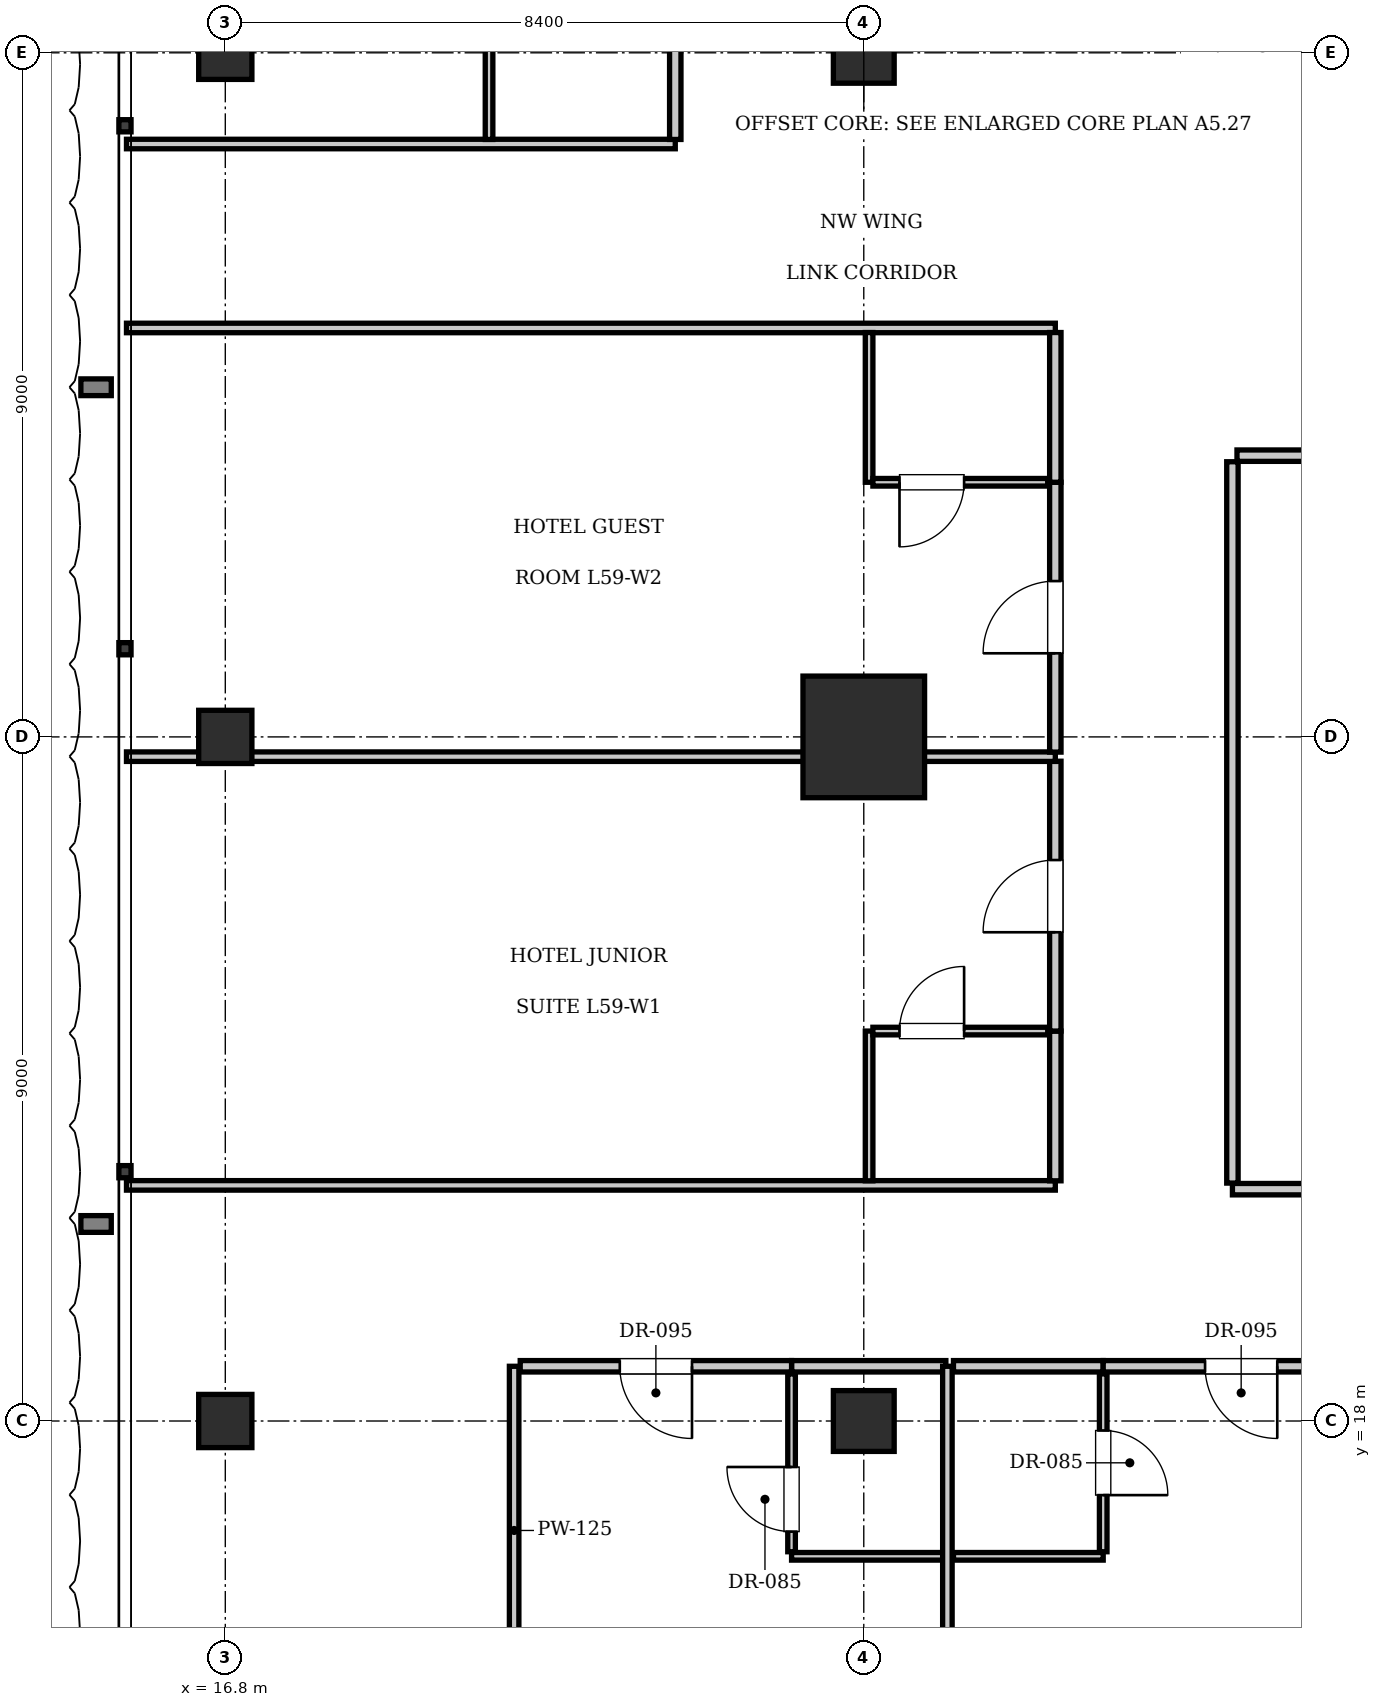
"""IFC4 building model, lengths in metres.
Left out: names, types, materials, properties, quantities, classifications, styles, units other than length and angle.
Written with IfcOpenShell. Run it as: python <this file> out.ifc"""

import sys

from ifc_helpers import new_model, si_unit, direction, frame, frame_2d, origin, origin_2d, place, context, subcontext, project, spatial, rectangle, extrude, element, fill, save


model = new_model("IFC4")
c1 = context("Model", 3, precision=1e-05, world=origin(), true_north=direction((0.0, 1.0)))
c2 = subcontext(c1, "Body", "Model", "MODEL_VIEW")
j1 = project(units=[si_unit("LENGTHUNIT", "METRE"), si_unit("PLANEANGLEUNIT", "RADIAN")], contexts=[c1])
p1 = place(None, origin())
s1 = spatial("IfcSite", under=j1, at=p1, CompositionType="ELEMENT")
p2 = place(p1, origin())
s2 = spatial("IfcBuilding", under=s1, at=p2, CompositionType="ELEMENT")
p3 = place(p2, frame((0.0, 0.0, 243.25)))
s3 = spatial("IfcBuildingStorey", under=s2, at=p3, CompositionType="ELEMENT", Elevation=243.25)
p4 = place(p3, frame((25.2, 27.0, 0.0), z_axis=(0.0, 0.0, 1.0), x_axis=(1.0, 0.0, 0.0)))
e1 = element("IfcColumn", 1, at=p4, inside=s3, PredefinedType="COLUMN", context=c2, shape_type="SweptSolid", body=[
    extrude(rectangle(XDim=1.6, YDim=1.6, at=origin_2d()), origin(), (0.0, 0.0, 1.0), 3.85),
])
for number, where, z_axis, x_axis in (
    (2, (25.2, 36.0, 0.0), (0.0, 0.0, 1.0), (1.0, 0.0, 0.0)),
    (3, (25.2, 18.0, 0.0), (0.0, 0.0, 1.0), (1.0, 0.0, 0.0)),
):
    element("IfcColumn", number, at=place(p3, frame(where, z_axis=z_axis, x_axis=x_axis)), inside=s3, PredefinedType="COLUMN", context=c2, shape_type="SweptSolid", body=[
        extrude(rectangle(XDim=0.8, YDim=0.8, at=origin_2d()), origin(), (0.0, 0.0, 1.0), 3.85),
    ])
for number, where, z_axis, x_axis in (
    (4, (16.8, 18.0, 0.0), (0.0, 0.0, 1.0), (1.0, 0.0, 0.0)),
    (5, (16.8, 27.0, 0.0), (0.0, 0.0, 1.0), (1.0, 0.0, 0.0)),
    (6, (16.8, 36.0, 0.0), (0.0, 0.0, 1.0), (1.0, 0.0, 0.0)),
):
    element("IfcColumn", number, at=place(p3, frame(where, z_axis=z_axis, x_axis=x_axis)), inside=s3, PredefinedType="COLUMN", context=c2, shape_type="SweptSolid", body=[
        extrude(rectangle(XDim=0.7, YDim=0.7, at=origin_2d()), origin(), (0.0, 0.0, 1.0), 3.85),
    ])
p5 = place(p3, frame((30.05, 21.05, 0.0), z_axis=(0.0, 0.0, 1.0), x_axis=(1.0, 0.0, 0.0)))
e7 = element("IfcWall", 7, at=p5, inside=s3, PredefinedType="PARTITIONING", context=c2, shape_type="SweptSolid", body=[
    extrude(rectangle(XDim=15.55, YDim=0.15, at=frame_2d((7.775, 0.0))), origin(), (0.0, 0.0, 1.0), 3.61),
])
p6 = place(p3, frame((30.05, 21.13, 0.0), z_axis=(0.0, 0.0, 1.0), x_axis=(0.0, 1.0, 0.0)))
e8 = element("IfcWall", 8, at=p6, inside=s3, PredefinedType="PARTITIONING", context=c2, shape_type="SweptSolid", body=[
    extrude(rectangle(XDim=9.49, YDim=0.15, at=frame_2d((4.745, 0.0))), origin(), (0.0, 0.0, 1.0), 3.61),
])
p7 = place(p3, frame((30.11, 30.7, 0.0), z_axis=(0.0, 0.0, 1.0), x_axis=(1.0, 0.0, 0.0)))
e9 = element("IfcWall", 9, at=p7, inside=s3, PredefinedType="PARTITIONING", context=c2, shape_type="SweptSolid", body=[
    extrude(rectangle(XDim=5.663, YDim=0.15, at=frame_2d((2.832, 0.0))), origin(), (0.0, 0.0, 1.0), 3.61),
])
p8 = place(p7, frame((2.382, 0.0, 0.0)))
e10 = element("IfcOpeningElement", 10, at=p8, cuts=e9, PredefinedType="OPENING", context=c2, shape_type="SweptSolid", body=[
    extrude(rectangle(XDim=0.9, YDim=2.1, at=frame_2d((0.45, 1.05))), frame((0.0, 0.085, 0.0), z_axis=(0.0, -1.0, 0.0), x_axis=(1.0, 0.0, 0.0)), (0.0, 0.0, 1.0), 0.17),
])
p9 = place(p3, frame((20.6, 14.4, 0.0), z_axis=(0.0, 0.0, 1.0), x_axis=(0.0, 1.0, 0.0)))
e11 = element("IfcWall", 11, at=p9, inside=s3, PredefinedType="PARTITIONING", context=c2, shape_type="SweptSolid", body=[
    extrude(rectangle(XDim=4.32, YDim=0.125, at=frame_2d((2.16, 0.0))), origin(), (0.0, 0.0, 1.0), 3.61),
])
p10 = place(p3, frame((24.25, 18.72, 0.0), z_axis=(0.0, 0.0, 1.0), x_axis=(1.0, 0.0, 0.0)))
e12 = element("IfcWall", 12, at=p10, inside=s3, PredefinedType="PARTITIONING", context=c2, shape_type="SweptSolid", body=[
    extrude(rectangle(XDim=2.03, YDim=0.15, at=frame_2d((1.015, 0.0))), origin(), (0.0, 0.0, 1.0), 3.61),
])
p11 = place(p3, frame((24.25, 16.22, 0.0), z_axis=(0.0, 0.0, 1.0), x_axis=(1.0, 0.0, 0.0)))
e13 = element("IfcWall", 13, at=p11, inside=s3, PredefinedType="PARTITIONING", context=c2, shape_type="SweptSolid", body=[
    extrude(rectangle(XDim=2.01, YDim=0.1, at=frame_2d((1.005, 0.0))), origin(), (0.0, 0.0, 1.0), 3.61),
])
p12 = place(p3, frame((24.25, 16.28, 0.0), z_axis=(0.0, 0.0, 1.0), x_axis=(0.0, 1.0, 0.0)))
e14 = element("IfcWall", 14, at=p12, inside=s3, PredefinedType="PARTITIONING", context=c2, shape_type="SweptSolid", body=[
    extrude(rectangle(XDim=2.34, YDim=0.1, at=frame_2d((1.17, 0.0))), origin(), (0.0, 0.0, 1.0), 3.61),
])
p13 = place(p12, frame((0.265, 0.0, 0.0)))
e15 = element("IfcOpeningElement", 15, at=p13, cuts=e14, PredefinedType="OPENING", context=c2, shape_type="SweptSolid", body=[
    extrude(rectangle(XDim=0.85, YDim=2.1, at=frame_2d((0.425, 1.05))), frame((0.0, 0.06, 0.0), z_axis=(0.0, -1.0, 0.0), x_axis=(1.0, 0.0, 0.0)), (0.0, 0.0, 1.0), 0.12),
])
p14 = place(p3, frame((20.68, 18.72, 0.0), z_axis=(0.0, 0.0, 1.0), x_axis=(1.0, 0.0, 0.0)))
e16 = element("IfcWall", 16, at=p14, inside=s3, PredefinedType="PARTITIONING", context=c2, shape_type="SweptSolid", body=[
    extrude(rectangle(XDim=3.57, YDim=0.15, at=frame_2d((1.785, 0.0))), origin(), (0.0, 0.0, 1.0), 3.61),
])
p15 = place(p14, frame((1.31, 0.0, 0.0)))
e17 = element("IfcOpeningElement", 17, at=p15, cuts=e16, PredefinedType="OPENING", context=c2, shape_type="SweptSolid", body=[
    extrude(rectangle(XDim=0.95, YDim=2.15, at=frame_2d((0.475, 1.075))), frame((0.0, 0.085, 0.0), z_axis=(0.0, -1.0, 0.0), x_axis=(1.0, 0.0, 0.0)), (0.0, 0.0, 1.0), 0.17),
])
p16 = place(p3, frame((26.3, 9.3, 0.0), z_axis=(0.0, 0.0, 1.0), x_axis=(0.0, 1.0, 0.0)))
e18 = element("IfcWall", 18, at=p16, inside=s3, PredefinedType="PARTITIONING", context=c2, shape_type="SweptSolid", body=[
    extrude(rectangle(XDim=9.42, YDim=0.125, at=frame_2d((4.71, 0.0))), origin(), (0.0, 0.0, 1.0), 3.61),
])
p17 = place(p3, frame((26.38, 18.72, 0.0), z_axis=(0.0, 0.0, 1.0), x_axis=(1.0, 0.0, 0.0)))
e19 = element("IfcWall", 19, at=p17, inside=s3, PredefinedType="PARTITIONING", context=c2, shape_type="SweptSolid", body=[
    extrude(rectangle(XDim=1.97, YDim=0.15, at=frame_2d((0.985, 0.0))), origin(), (0.0, 0.0, 1.0), 3.61),
])
p18 = place(p3, frame((26.38, 16.22, 0.0), z_axis=(0.0, 0.0, 1.0), x_axis=(1.0, 0.0, 0.0)))
e20 = element("IfcWall", 20, at=p18, inside=s3, PredefinedType="PARTITIONING", context=c2, shape_type="SweptSolid", body=[
    extrude(rectangle(XDim=1.97, YDim=0.1, at=frame_2d((0.985, 0.0))), origin(), (0.0, 0.0, 1.0), 3.61),
])
p19 = place(p3, frame((28.35, 16.28, 0.0), z_axis=(0.0, 0.0, 1.0), x_axis=(0.0, 1.0, 0.0)))
e21 = element("IfcWall", 21, at=p19, inside=s3, PredefinedType="PARTITIONING", context=c2, shape_type="SweptSolid", body=[
    extrude(rectangle(XDim=2.34, YDim=0.1, at=frame_2d((1.17, 0.0))), origin(), (0.0, 0.0, 1.0), 3.61),
])
p20 = place(p19, frame((0.745, 0.0, 0.0)))
e22 = element("IfcOpeningElement", 22, at=p20, cuts=e21, PredefinedType="OPENING", context=c2, shape_type="SweptSolid", body=[
    extrude(rectangle(XDim=0.85, YDim=2.1, at=frame_2d((0.425, 1.05))), frame((0.0, 0.06, 0.0), z_axis=(0.0, -1.0, 0.0), x_axis=(1.0, 0.0, 0.0)), (0.0, 0.0, 1.0), 0.12),
])
p21 = place(p3, frame((28.35, 18.72, 0.0), z_axis=(0.0, 0.0, 1.0), x_axis=(1.0, 0.0, 0.0)))
e23 = element("IfcWall", 23, at=p21, inside=s3, PredefinedType="PARTITIONING", context=c2, shape_type="SweptSolid", body=[
    extrude(rectangle(XDim=3.63, YDim=0.15, at=frame_2d((1.815, 0.0))), origin(), (0.0, 0.0, 1.0), 3.61),
])
p22 = place(p21, frame((1.34, 0.0, 0.0)))
e24 = element("IfcOpeningElement", 24, at=p22, cuts=e23, PredefinedType="OPENING", context=c2, shape_type="SweptSolid", body=[
    extrude(rectangle(XDim=0.95, YDim=2.15, at=frame_2d((0.475, 1.075))), frame((0.0, 0.085, 0.0), z_axis=(0.0, -1.0, 0.0), x_axis=(1.0, 0.0, 0.0)), (0.0, 0.0, 1.0), 0.17),
])
for number, where, z_axis, x_axis in (
    (25, (15.5, 21.1, 0.0), (0.0, 0.0, 1.0), (1.0, 0.0, 0.0)),
    (26, (15.5, 32.38, 0.0), (0.0, 0.0, 1.0), (1.0, 0.0, 0.0)),
):
    element("IfcWall", number, at=place(p3, frame(where, z_axis=z_axis, x_axis=x_axis)), inside=s3, PredefinedType="PARTITIONING", context=c2, shape_type="SweptSolid", body=[
        extrude(rectangle(XDim=12.22, YDim=0.125, at=frame_2d((6.11, 0.0))), origin(), (0.0, 0.0, 1.0), 3.61),
    ])
p23 = place(p3, frame((27.72, 21.16, 0.0), z_axis=(0.0, 0.0, 1.0), x_axis=(0.0, 1.0, 0.0)))
e27 = element("IfcWall", 27, at=p23, inside=s3, PredefinedType="PARTITIONING", context=c2, shape_type="SweptSolid", body=[
    extrude(rectangle(XDim=1.97, YDim=0.15, at=frame_2d((0.985, 0.0))), origin(), (0.0, 0.0, 1.0), 3.61),
])
p24 = place(p3, frame((27.72, 23.13, 0.0), z_axis=(0.0, 0.0, 1.0), x_axis=(0.0, 1.0, 0.0)))
e28 = element("IfcWall", 28, at=p24, inside=s3, PredefinedType="PARTITIONING", context=c2, shape_type="SweptSolid", body=[
    extrude(rectangle(XDim=3.55, YDim=0.15, at=frame_2d((1.775, 0.0))), origin(), (0.0, 0.0, 1.0), 3.61),
])
p25 = place(p24, frame((1.3, 0.0, 0.0)))
e29 = element("IfcOpeningElement", 29, at=p25, cuts=e28, PredefinedType="OPENING", context=c2, shape_type="SweptSolid", body=[
    extrude(rectangle(XDim=0.95, YDim=2.15, at=frame_2d((0.475, 1.075))), frame((0.0, 0.085, 0.0), z_axis=(0.0, -1.0, 0.0), x_axis=(1.0, 0.0, 0.0)), (0.0, 0.0, 1.0), 0.17),
])
p26 = place(p3, frame((25.27, 21.16, 0.0), z_axis=(0.0, 0.0, 1.0), x_axis=(0.0, 1.0, 0.0)))
e30 = element("IfcWall", 30, at=p26, inside=s3, PredefinedType="PARTITIONING", context=c2, shape_type="SweptSolid", body=[
    extrude(rectangle(XDim=1.97, YDim=0.1, at=frame_2d((0.985, 0.0))), origin(), (0.0, 0.0, 1.0), 3.077),
])
p27 = place(p3, frame((25.32, 23.13, 0.0), z_axis=(0.0, 0.0, 1.0), x_axis=(1.0, 0.0, 0.0)))
e31 = element("IfcWall", 31, at=p27, inside=s3, PredefinedType="PARTITIONING", context=c2, shape_type="SweptSolid", body=[
    extrude(rectangle(XDim=2.3, YDim=0.1, at=frame_2d((1.15, 0.0))), origin(), (0.0, 0.0, 1.0), 3.61),
])
p28 = place(p27, frame((0.35, 0.0, 0.0)))
e32 = element("IfcOpeningElement", 32, at=p28, cuts=e31, PredefinedType="OPENING", context=c2, shape_type="SweptSolid", body=[
    extrude(rectangle(XDim=0.85, YDim=2.1, at=frame_2d((0.425, 1.05))), frame((0.0, 0.06, 0.0), z_axis=(0.0, -1.0, 0.0), x_axis=(1.0, 0.0, 0.0)), (0.0, 0.0, 1.0), 0.12),
])
p29 = place(p3, frame((15.5, 26.74, 0.0), z_axis=(0.0, 0.0, 1.0), x_axis=(1.0, 0.0, 0.0)))
e33 = element("IfcWall", 33, at=p29, inside=s3, PredefinedType="PARTITIONING", context=c2, shape_type="SweptSolid", body=[
    extrude(rectangle(XDim=12.22, YDim=0.125, at=frame_2d((6.11, 0.0))), origin(), (0.0, 0.0, 1.0), 2.41),
])
p30 = place(p3, frame((27.72, 26.8, 0.0), z_axis=(0.0, 0.0, 1.0), x_axis=(0.0, 1.0, 0.0)))
e34 = element("IfcWall", 34, at=p30, inside=s3, PredefinedType="PARTITIONING", context=c2, shape_type="SweptSolid", body=[
    extrude(rectangle(XDim=3.55, YDim=0.15, at=frame_2d((1.775, 0.0))), origin(), (0.0, 0.0, 1.0), 3.61),
])
p31 = place(p30, frame((1.3, 0.0, 0.0)))
e35 = element("IfcOpeningElement", 35, at=p31, cuts=e34, PredefinedType="OPENING", context=c2, shape_type="SweptSolid", body=[
    extrude(rectangle(XDim=0.95, YDim=2.15, at=frame_2d((0.475, 1.075))), frame((0.0, 0.085, 0.0), z_axis=(0.0, -1.0, 0.0), x_axis=(1.0, 0.0, 0.0)), (0.0, 0.0, 1.0), 0.17),
])
p32 = place(p3, frame((27.72, 30.35, 0.0), z_axis=(0.0, 0.0, 1.0), x_axis=(0.0, 1.0, 0.0)))
e36 = element("IfcWall", 36, at=p32, inside=s3, PredefinedType="PARTITIONING", context=c2, shape_type="SweptSolid", body=[
    extrude(rectangle(XDim=1.97, YDim=0.15, at=frame_2d((0.985, 0.0))), origin(), (0.0, 0.0, 1.0), 3.61),
])
p33 = place(p3, frame((25.27, 30.35, 0.0), z_axis=(0.0, 0.0, 1.0), x_axis=(0.0, 1.0, 0.0)))
e37 = element("IfcWall", 37, at=p33, inside=s3, PredefinedType="PARTITIONING", context=c2, shape_type="SweptSolid", body=[
    extrude(rectangle(XDim=1.97, YDim=0.1, at=frame_2d((0.985, 0.0))), origin(), (0.0, 0.0, 1.0), 3.077),
])
p34 = place(p3, frame((25.32, 30.35, 0.0), z_axis=(0.0, 0.0, 1.0), x_axis=(1.0, 0.0, 0.0)))
e38 = element("IfcWall", 38, at=p34, inside=s3, PredefinedType="PARTITIONING", context=c2, shape_type="SweptSolid", body=[
    extrude(rectangle(XDim=2.3, YDim=0.1, at=frame_2d((1.15, 0.0))), origin(), (0.0, 0.0, 1.0), 3.61),
])
p35 = place(p34, frame((0.35, 0.0, 0.0)))
e39 = element("IfcOpeningElement", 39, at=p35, cuts=e38, PredefinedType="OPENING", context=c2, shape_type="SweptSolid", body=[
    extrude(rectangle(XDim=0.85, YDim=2.1, at=frame_2d((0.425, 1.05))), frame((0.0, 0.06, 0.0), z_axis=(0.0, -1.0, 0.0), x_axis=(1.0, 0.0, 0.0)), (0.0, 0.0, 1.0), 0.12),
])
p36 = place(p3, frame((15.5, 34.8, 0.0), z_axis=(0.0, 0.0, 1.0), x_axis=(1.0, 0.0, 0.0)))
e40 = element("IfcWall", 40, at=p36, inside=s3, PredefinedType="PARTITIONING", context=c2, shape_type="SweptSolid", body=[
    extrude(rectangle(XDim=7.22, YDim=0.125, at=frame_2d((3.61, 0.0))), origin(), (0.0, 0.0, 1.0), 3.61),
])
p37 = place(p3, frame((22.72, 34.86, 0.0), z_axis=(0.0, 0.0, 1.0), x_axis=(0.0, 1.0, 0.0)))
e41 = element("IfcWall", 41, at=p37, inside=s3, PredefinedType="PARTITIONING", context=c2, shape_type="SweptSolid", body=[
    extrude(rectangle(XDim=2.29, YDim=0.15, at=frame_2d((1.145, 0.0))), origin(), (0.0, 0.0, 1.0), 3.61),
])
p38 = place(p3, frame((20.27, 34.86, 0.0), z_axis=(0.0, 0.0, 1.0), x_axis=(0.0, 1.0, 0.0)))
e42 = element("IfcWall", 42, at=p38, inside=s3, PredefinedType="PARTITIONING", context=c2, shape_type="SweptSolid", body=[
    extrude(rectangle(XDim=2.29, YDim=0.1, at=frame_2d((1.145, 0.0))), origin(), (0.0, 0.0, 1.0), 3.61),
])
p39 = place(p13, origin())
e43 = element("IfcDoor", 43, at=p39, inside=s3, OperationType="SINGLE_SWING_RIGHT", PredefinedType="DOOR", context=c2, shape_type="SweptSolid", body=[
    extrude(rectangle(XDim=0.85, YDim=2.1, at=frame_2d((0.425, 1.05))), frame((0.0, 0.025, 0.0), z_axis=(0.0, -1.0, 0.0), x_axis=(1.0, 0.0, 0.0)), (0.0, 0.0, 1.0), 0.05),
])
fill(e15, e43)
p40 = place(p15, frame((0.95, 0.0, 0.0), z_axis=(0.0, 0.0, 1.0), x_axis=(-1.0, 0.0, 0.0)))
e44 = element("IfcDoor", 44, at=p40, inside=s3, OperationType="SINGLE_SWING_LEFT", PredefinedType="DOOR", context=c2, shape_type="SweptSolid", body=[
    extrude(rectangle(XDim=0.95, YDim=2.15, at=frame_2d((0.475, 1.075))), frame((0.0, 0.025, 0.0), z_axis=(0.0, -1.0, 0.0), x_axis=(1.0, 0.0, 0.0)), (0.0, 0.0, 1.0), 0.05),
])
fill(e17, e44)
p41 = place(p20, frame((0.85, 0.0, 0.0), z_axis=(0.0, 0.0, 1.0), x_axis=(-1.0, 0.0, 0.0)))
e45 = element("IfcDoor", 45, at=p41, inside=s3, OperationType="SINGLE_SWING_RIGHT", PredefinedType="DOOR", context=c2, shape_type="SweptSolid", body=[
    extrude(rectangle(XDim=0.85, YDim=2.1, at=frame_2d((0.425, 1.05))), frame((0.0, 0.025, 0.0), z_axis=(0.0, -1.0, 0.0), x_axis=(1.0, 0.0, 0.0)), (0.0, 0.0, 1.0), 0.05),
])
fill(e22, e45)
p42 = place(p22, frame((0.95, 0.0, 0.0), z_axis=(0.0, 0.0, 1.0), x_axis=(-1.0, 0.0, 0.0)))
e46 = element("IfcDoor", 46, at=p42, inside=s3, OperationType="SINGLE_SWING_LEFT", PredefinedType="DOOR", context=c2, shape_type="SweptSolid", body=[
    extrude(rectangle(XDim=0.95, YDim=2.15, at=frame_2d((0.475, 1.075))), frame((0.0, 0.025, 0.0), z_axis=(0.0, -1.0, 0.0), x_axis=(1.0, 0.0, 0.0)), (0.0, 0.0, 1.0), 0.05),
])
fill(e24, e46)
p43 = place(p28, origin())
e47 = element("IfcDoor", 47, at=p43, inside=s3, OperationType="SINGLE_SWING_RIGHT", PredefinedType="DOOR", context=c2, shape_type="SweptSolid", body=[
    extrude(rectangle(XDim=0.85, YDim=2.1, at=frame_2d((0.425, 1.05))), frame((0.0, 0.025, 0.0), z_axis=(0.0, -1.0, 0.0), x_axis=(1.0, 0.0, 0.0)), (0.0, 0.0, 1.0), 0.05),
])
fill(e32, e47)
p44 = place(p25, origin())
e48 = element("IfcDoor", 48, at=p44, inside=s3, OperationType="SINGLE_SWING_LEFT", PredefinedType="DOOR", context=c2, shape_type="SweptSolid", body=[
    extrude(rectangle(XDim=0.95, YDim=2.15, at=frame_2d((0.475, 1.075))), frame((0.0, 0.025, 0.0), z_axis=(0.0, -1.0, 0.0), x_axis=(1.0, 0.0, 0.0)), (0.0, 0.0, 1.0), 0.05),
])
fill(e29, e48)
p45 = place(p35, frame((0.85, 0.0, 0.0), z_axis=(0.0, 0.0, 1.0), x_axis=(-1.0, 0.0, 0.0)))
e49 = element("IfcDoor", 49, at=p45, inside=s3, OperationType="SINGLE_SWING_RIGHT", PredefinedType="DOOR", context=c2, shape_type="SweptSolid", body=[
    extrude(rectangle(XDim=0.85, YDim=2.1, at=frame_2d((0.425, 1.05))), frame((0.0, 0.025, 0.0), z_axis=(0.0, -1.0, 0.0), x_axis=(1.0, 0.0, 0.0)), (0.0, 0.0, 1.0), 0.05),
])
fill(e39, e49)
p46 = place(p31, origin())
e50 = element("IfcDoor", 50, at=p46, inside=s3, OperationType="SINGLE_SWING_LEFT", PredefinedType="DOOR", context=c2, shape_type="SweptSolid", body=[
    extrude(rectangle(XDim=0.95, YDim=2.15, at=frame_2d((0.475, 1.075))), frame((0.0, 0.025, 0.0), z_axis=(0.0, -1.0, 0.0), x_axis=(1.0, 0.0, 0.0)), (0.0, 0.0, 1.0), 0.05),
])
fill(e35, e50)
save(model, sys.argv[1])
